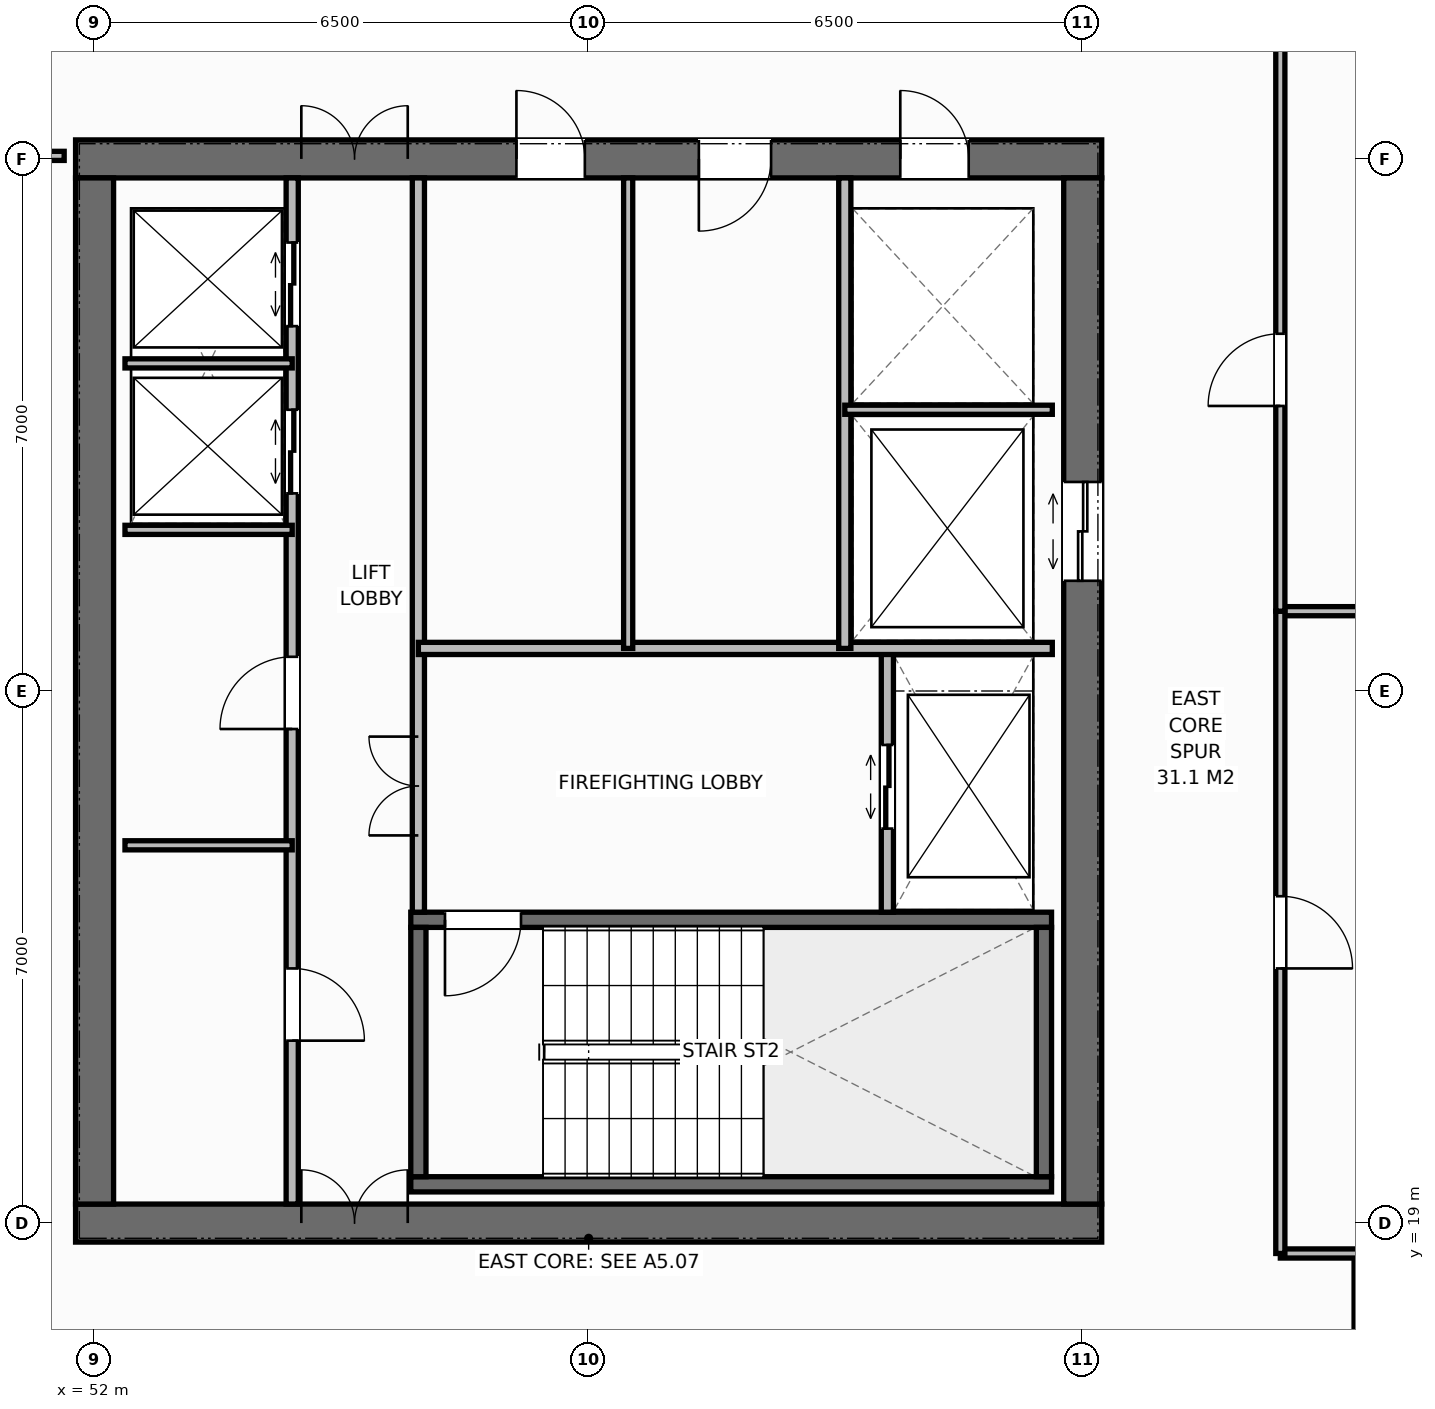
"""IFC4 building model, lengths in metres.
Left out: names, types, materials, properties, quantities, classifications, styles, units other than length and angle.
Written with IfcOpenShell. Run it as: python <this file> out.ifc"""

import sys

from ifc_helpers import new_model, si_unit, direction, frame, frame_2d, origin, place, context, subcontext, project, spatial, rectangle, extrude, element, fill, save


model = new_model("IFC4")
c1 = context("Model", 3, precision=1e-05, world=origin(), true_north=direction((0.0, 1.0)))
c2 = subcontext(c1, "Body", "Model", "MODEL_VIEW")
j1 = project(units=[si_unit("LENGTHUNIT", "METRE"), si_unit("PLANEANGLEUNIT", "RADIAN")], contexts=[c1])
p1 = place(None, origin())
s1 = spatial("IfcSite", under=j1, at=p1, CompositionType="ELEMENT")
p2 = place(p1, origin())
s2 = spatial("IfcBuilding", under=s1, at=p2, CompositionType="ELEMENT")
p3 = place(p2, frame((0.0, 0.0, 244.2)))
s3 = spatial("IfcBuildingStorey", under=s2, at=p3, CompositionType="ELEMENT", Elevation=244.2)
p4 = place(p3, frame((51.75, 19.0, 0.0), z_axis=(0.0, 0.0, 1.0), x_axis=(1.0, 0.0, 0.0)))
e1 = element("IfcWall", 1, at=p4, inside=s3, PredefinedType="SHEAR", context=c2, shape_type="SweptSolid", body=[
    extrude(rectangle(XDim=13.5, YDim=0.5, at=frame_2d((6.75, 0.0))), origin(), (0.0, 0.0, 1.0), 3.8),
])
p5 = place(p4, frame((2.97, 0.0, 0.0)))
e2 = element("IfcOpeningElement", 2, at=p5, cuts=e1, PredefinedType="OPENING", context=c2, shape_type="SweptSolid", body=[
    extrude(rectangle(XDim=1.4, YDim=2.2, at=frame_2d((0.7, 1.1))), frame((0.0, 0.26, 0.0), z_axis=(0.0, -1.0, 0.0), x_axis=(1.0, 0.0, 0.0)), (0.0, 0.0, 1.0), 0.52),
])
p6 = place(p3, frame((51.75, 33.0, 0.0), z_axis=(0.0, 0.0, 1.0), x_axis=(1.0, 0.0, 0.0)))
e3 = element("IfcWall", 3, at=p6, inside=s3, PredefinedType="SHEAR", context=c2, shape_type="SweptSolid", body=[
    extrude(rectangle(XDim=13.5, YDim=0.5, at=frame_2d((6.75, 0.0))), origin(), (0.0, 0.0, 1.0), 3.8),
])
p7 = place(p6, frame((2.97, 0.0, 0.0)))
e4 = element("IfcOpeningElement", 4, at=p7, cuts=e3, PredefinedType="OPENING", context=c2, shape_type="SweptSolid", body=[
    extrude(rectangle(XDim=1.4, YDim=2.2, at=frame_2d((0.7, 1.1))), frame((0.0, 0.26, 0.0), z_axis=(0.0, -1.0, 0.0), x_axis=(1.0, 0.0, 0.0)), (0.0, 0.0, 1.0), 0.52),
])
p8 = place(p6, frame((10.85, 0.0, 0.0)))
e5 = element("IfcOpeningElement", 5, at=p8, cuts=e3, PredefinedType="OPENING", context=c2, shape_type="SweptSolid", body=[
    extrude(rectangle(XDim=0.9, YDim=2.15, at=frame_2d((0.45, 1.075))), frame((0.0, 0.26, 0.0), z_axis=(0.0, -1.0, 0.0), x_axis=(1.0, 0.0, 0.0)), (0.0, 0.0, 1.0), 0.52),
])
p9 = place(p6, frame((5.8, 0.0, 0.0)))
e6 = element("IfcOpeningElement", 6, at=p9, cuts=e3, PredefinedType="OPENING", context=c2, shape_type="SweptSolid", body=[
    extrude(rectangle(XDim=0.9, YDim=2.15, at=frame_2d((0.45, 1.075))), frame((0.0, 0.26, 0.0), z_axis=(0.0, -1.0, 0.0), x_axis=(1.0, 0.0, 0.0)), (0.0, 0.0, 1.0), 0.52),
])
p10 = place(p6, frame((8.2, 0.0, 0.0)))
e7 = element("IfcOpeningElement", 7, at=p10, cuts=e3, PredefinedType="OPENING", context=c2, shape_type="SweptSolid", body=[
    extrude(rectangle(XDim=0.95, YDim=2.15, at=frame_2d((0.475, 1.075))), frame((0.0, 0.26, 0.0), z_axis=(0.0, -1.0, 0.0), x_axis=(1.0, 0.0, 0.0)), (0.0, 0.0, 1.0), 0.52),
])
p11 = place(p3, frame((52.0, 19.25, 0.0), z_axis=(0.0, 0.0, 1.0), x_axis=(0.0, 1.0, 0.0)))
e8 = element("IfcWall", 8, at=p11, inside=s3, PredefinedType="SHEAR", context=c2, shape_type="SweptSolid", body=[
    extrude(rectangle(XDim=13.5, YDim=0.5, at=frame_2d((6.75, 0.0))), origin(), (0.0, 0.0, 1.0), 3.8),
])
p12 = place(p3, frame((65.0, 19.25, 0.0), z_axis=(0.0, 0.0, 1.0), x_axis=(0.0, 1.0, 0.0)))
e9 = element("IfcWall", 9, at=p12, inside=s3, PredefinedType="SHEAR", context=c2, shape_type="SweptSolid", body=[
    extrude(rectangle(XDim=13.5, YDim=0.5, at=frame_2d((6.75, 0.0))), origin(), (0.0, 0.0, 1.0), 3.8),
])
p13 = place(p12, frame((8.2, 0.0, 0.0)))
e10 = element("IfcOpeningElement", 10, at=p13, cuts=e9, PredefinedType="OPENING", context=c2, shape_type="SweptSolid", body=[
    extrude(rectangle(XDim=1.3, YDim=2.2, at=frame_2d((0.65, 1.1))), frame((0.0, 0.26, 0.0), z_axis=(0.0, -1.0, 0.0), x_axis=(1.0, 0.0, 0.0)), (0.0, 0.0, 1.0), 0.52),
])
p14 = place(p3, frame((56.16, 19.51, 0.0), z_axis=(0.0, 0.0, 1.0), x_axis=(1.0, 0.0, 0.0)))
e11 = element("IfcWall", 11, at=p14, inside=s3, PredefinedType="SHEAR", context=c2, shape_type="SweptSolid", body=[
    extrude(rectangle(XDim=8.43, YDim=0.2, at=frame_2d((4.215, 0.0))), origin(), (0.0, 0.0, 1.0), 3.8),
])
p15 = place(p3, frame((56.16, 22.99, 0.0), z_axis=(0.0, 0.0, 1.0), x_axis=(1.0, 0.0, 0.0)))
e12 = element("IfcWall", 12, at=p15, inside=s3, PredefinedType="SHEAR", context=c2, shape_type="SweptSolid", body=[
    extrude(rectangle(XDim=8.43, YDim=0.2, at=frame_2d((4.215, 0.0))), origin(), (0.0, 0.0, 1.0), 3.8),
])
p16 = place(p15, frame((0.45, 0.0, 0.0)))
e13 = element("IfcOpeningElement", 13, at=p16, cuts=e12, PredefinedType="OPENING", context=c2, shape_type="SweptSolid", body=[
    extrude(rectangle(XDim=1.0, YDim=2.15, at=frame_2d((0.5, 1.075))), frame((0.0, 0.11, 0.0), z_axis=(0.0, -1.0, 0.0), x_axis=(1.0, 0.0, 0.0)), (0.0, 0.0, 1.0), 0.22),
])
for number, where, z_axis, x_axis in (
    (14, (56.26, 19.61, 0.0), (0.0, 0.0, 1.0), (0.0, 1.0, 0.0)),
    (15, (64.49, 19.61, 0.0), (0.0, 0.0, 1.0), (0.0, 1.0, 0.0)),
):
    element("IfcWall", number, at=place(p3, frame(where, z_axis=z_axis, x_axis=x_axis)), inside=s3, PredefinedType="SHEAR", context=c2, shape_type="SweptSolid", body=[
        extrude(rectangle(XDim=3.28, YDim=0.2, at=frame_2d((1.64, 0.0))), origin(), (0.0, 0.0, 1.0), 3.8),
    ])
p17 = place(p3, frame((54.6, 19.25, 0.0), z_axis=(0.0, 0.0, 1.0), x_axis=(0.0, 1.0, 0.0)))
e16 = element("IfcWall", 16, at=p17, inside=s3, PredefinedType="STANDARD", context=c2, shape_type="SweptSolid", body=[
    extrude(rectangle(XDim=13.5, YDim=0.16, at=frame_2d((6.75, 0.0))), origin(), (0.0, 0.0, 1.0), 3.58),
])
p18 = place(p17, frame((2.15, 0.0, 0.0)))
e17 = element("IfcOpeningElement", 17, at=p18, cuts=e16, PredefinedType="OPENING", context=c2, shape_type="SweptSolid", body=[
    extrude(rectangle(XDim=0.95, YDim=2.15, at=frame_2d((0.475, 1.075))), frame((0.0, 0.09, 0.0), z_axis=(0.0, -1.0, 0.0), x_axis=(1.0, 0.0, 0.0)), (0.0, 0.0, 1.0), 0.18),
])
p19 = place(p17, frame((6.25, 0.0, 0.0)))
e18 = element("IfcOpeningElement", 18, at=p19, cuts=e16, PredefinedType="OPENING", context=c2, shape_type="SweptSolid", body=[
    extrude(rectangle(XDim=0.95, YDim=2.15, at=frame_2d((0.475, 1.075))), frame((0.0, 0.09, 0.0), z_axis=(0.0, -1.0, 0.0), x_axis=(1.0, 0.0, 0.0)), (0.0, 0.0, 1.0), 0.18),
])
p20 = place(p17, frame((9.35, 0.0, 0.0)))
e19 = element("IfcOpeningElement", 19, at=p20, cuts=e16, PredefinedType="OPENING", context=c2, shape_type="SweptSolid", body=[
    extrude(rectangle(XDim=1.1, YDim=2.2, at=frame_2d((0.55, 1.1))), frame((0.0, 0.09, 0.0), z_axis=(0.0, -1.0, 0.0), x_axis=(1.0, 0.0, 0.0)), (0.0, 0.0, 1.0), 0.18),
])
p21 = place(p17, frame((11.55, 0.0, 0.0)))
e20 = element("IfcOpeningElement", 20, at=p21, cuts=e16, PredefinedType="OPENING", context=c2, shape_type="SweptSolid", body=[
    extrude(rectangle(XDim=1.1, YDim=2.2, at=frame_2d((0.55, 1.1))), frame((0.0, 0.09, 0.0), z_axis=(0.0, -1.0, 0.0), x_axis=(1.0, 0.0, 0.0)), (0.0, 0.0, 1.0), 0.18),
])
p22 = place(p3, frame((56.26, 23.09, 0.0), z_axis=(0.0, 0.0, 1.0), x_axis=(0.0, 1.0, 0.0)))
e21 = element("IfcWall", 21, at=p22, inside=s3, PredefinedType="STANDARD", context=c2, shape_type="SweptSolid", body=[
    extrude(rectangle(XDim=9.66, YDim=0.16, at=frame_2d((4.83, 0.0))), origin(), (0.0, 0.0, 1.0), 3.58),
])
p23 = place(p22, frame((1.01, 0.0, 0.0)))
e22 = element("IfcOpeningElement", 22, at=p23, cuts=e21, PredefinedType="OPENING", context=c2, shape_type="SweptSolid", body=[
    extrude(rectangle(XDim=1.3, YDim=2.2, at=frame_2d((0.65, 1.1))), frame((0.0, 0.09, 0.0), z_axis=(0.0, -1.0, 0.0), x_axis=(1.0, 0.0, 0.0)), (0.0, 0.0, 1.0), 0.18),
])
for number, where, z_axis, x_axis in (
    (23, (52.4, 23.97, 0.0), (0.0, 0.0, 1.0), (1.0, 0.0, 0.0)),
    (24, (52.4, 28.12, 0.0), (0.0, 0.0, 1.0), (1.0, 0.0, 0.0)),
    (25, (52.4, 30.31, 0.0), (0.0, 0.0, 1.0), (1.0, 0.0, 0.0)),
):
    element("IfcWall", number, at=place(p3, frame(where, z_axis=z_axis, x_axis=x_axis)), inside=s3, PredefinedType="PARTITIONING", context=c2, shape_type="SweptSolid", body=[
        extrude(rectangle(XDim=2.2, YDim=0.12, at=frame_2d((1.1, 0.0))), origin(), (0.0, 0.0, 1.0), 3.58),
    ])
p24 = place(p3, frame((62.43, 23.09, 0.0), z_axis=(0.0, 0.0, 1.0), x_axis=(0.0, 1.0, 0.0)))
e26 = element("IfcWall", 26, at=p24, inside=s3, PredefinedType="STANDARD", context=c2, shape_type="SweptSolid", body=[
    extrude(rectangle(XDim=3.47, YDim=0.16, at=frame_2d((1.735, 0.0))), origin(), (0.0, 0.0, 1.0), 3.58),
])
p25 = place(p24, frame((1.1, 0.0, 0.0)))
e27 = element("IfcOpeningElement", 27, at=p25, cuts=e26, PredefinedType="OPENING", context=c2, shape_type="SweptSolid", body=[
    extrude(rectangle(XDim=1.1, YDim=2.2, at=frame_2d((0.55, 1.1))), frame((0.0, 0.09, 0.0), z_axis=(0.0, -1.0, 0.0), x_axis=(1.0, 0.0, 0.0)), (0.0, 0.0, 1.0), 0.18),
])
p26 = place(p3, frame((56.26, 26.56, 0.0), z_axis=(0.0, 0.0, 1.0), x_axis=(1.0, 0.0, 0.0)))
e28 = element("IfcWall", 28, at=p26, inside=s3, PredefinedType="STANDARD", context=c2, shape_type="SweptSolid", body=[
    extrude(rectangle(XDim=8.34, YDim=0.16, at=frame_2d((4.17, 0.0))), origin(), (0.0, 0.0, 1.0), 3.58),
])
p27 = place(p3, frame((61.87, 26.56, 0.0), z_axis=(0.0, 0.0, 1.0), x_axis=(0.0, 1.0, 0.0)))
e29 = element("IfcWall", 29, at=p27, inside=s3, PredefinedType="STANDARD", context=c2, shape_type="SweptSolid", body=[
    extrude(rectangle(XDim=6.19, YDim=0.16, at=frame_2d((3.095, 0.0))), origin(), (0.0, 0.0, 1.0), 3.58),
])
p28 = place(p3, frame((61.87, 29.7, 0.0), z_axis=(0.0, 0.0, 1.0), x_axis=(1.0, 0.0, 0.0)))
e30 = element("IfcWall", 30, at=p28, inside=s3, PredefinedType="PARTITIONING", context=c2, shape_type="SweptSolid", body=[
    extrude(rectangle(XDim=2.73, YDim=0.12, at=frame_2d((1.365, 0.0))), origin(), (0.0, 0.0, 1.0), 3.58),
])
p29 = place(p3, frame((59.02, 26.56, 0.0), z_axis=(0.0, 0.0, 1.0), x_axis=(0.0, 1.0, 0.0)))
e31 = element("IfcWall", 31, at=p29, inside=s3, PredefinedType="PARTITIONING", context=c2, shape_type="SweptSolid", body=[
    extrude(rectangle(XDim=6.19, YDim=0.12, at=frame_2d((3.095, 0.0))), origin(), (0.0, 0.0, 1.0), 3.58),
])
p30 = place(p3, frame((48.0, 33.04, 0.0), z_axis=(0.0, 0.0, 1.0), x_axis=(1.0, 0.0, 0.0)))
e32 = element("IfcWall", 32, at=p30, inside=s3, PredefinedType="PARTITIONING", context=c2, shape_type="SweptSolid", body=[
    extrude(rectangle(XDim=3.6, YDim=0.12, at=frame_2d((1.8, 0.0))), origin(), (0.0, 0.0, 1.0), 3.32),
])
p31 = place(p30, frame((1.1, 0.0, 0.0)))
e33 = element("IfcOpeningElement", 33, at=p31, cuts=e32, PredefinedType="OPENING", context=c2, shape_type="SweptSolid", body=[
    extrude(rectangle(XDim=0.95, YDim=2.15, at=frame_2d((0.475, 1.075))), frame((0.0, 0.07, 0.0), z_axis=(0.0, -1.0, 0.0), x_axis=(1.0, 0.0, 0.0)), (0.0, 0.0, 1.0), 0.14),
])
p32 = place(p3, frame((68.63, 16.5, 0.0), z_axis=(0.0, 0.0, 1.0), x_axis=(0.0, 1.0, 0.0)))
e34 = element("IfcWall", 34, at=p32, inside=s3, PredefinedType="PARTITIONING", context=c2, shape_type="SweptSolid", body=[
    extrude(rectangle(XDim=2.1, YDim=0.12, at=frame_2d((1.05, 0.0))), origin(), (0.0, 0.0, 1.0), 3.58),
])
for number, where, z_axis, x_axis in (
    (35, (67.6, 18.6, 0.0), (0.0, 0.0, 1.0), (1.0, 0.0, 0.0)),
    (36, (67.6, 27.05, 0.0), (0.0, 0.0, 1.0), (1.0, 0.0, 0.0)),
):
    element("IfcWall", number, at=place(p3, frame(where, z_axis=z_axis, x_axis=x_axis)), inside=s3, PredefinedType="PARTITIONING", context=c2, shape_type="SweptSolid", body=[
        extrude(rectangle(XDim=4.58, YDim=0.12, at=frame_2d((2.29, 0.0))), origin(), (0.0, 0.0, 1.0), 3.58),
    ])
p33 = place(p3, frame((67.6, 18.6, 0.0), z_axis=(0.0, 0.0, 1.0), x_axis=(0.0, 1.0, 0.0)))
e37 = element("IfcWall", 37, at=p33, inside=s3, PredefinedType="PARTITIONING", context=c2, shape_type="SweptSolid", body=[
    extrude(rectangle(XDim=8.45, YDim=0.12, at=frame_2d((4.225, 0.0))), origin(), (0.0, 0.0, 1.0), 3.58),
])
p34 = place(p33, frame((3.75, 0.0, 0.0)))
e38 = element("IfcOpeningElement", 38, at=p34, cuts=e37, PredefinedType="OPENING", context=c2, shape_type="SweptSolid", body=[
    extrude(rectangle(XDim=0.95, YDim=2.15, at=frame_2d((0.475, 1.075))), frame((0.0, 0.07, 0.0), z_axis=(0.0, -1.0, 0.0), x_axis=(1.0, 0.0, 0.0)), (0.0, 0.0, 1.0), 0.14),
])
p35 = place(p3, frame((67.6, 27.05, 0.0), z_axis=(0.0, 0.0, 1.0), x_axis=(0.0, 1.0, 0.0)))
e39 = element("IfcWall", 39, at=p35, inside=s3, PredefinedType="PARTITIONING", context=c2, shape_type="SweptSolid", body=[
    extrude(rectangle(XDim=8.45, YDim=0.12, at=frame_2d((4.225, 0.0))), origin(), (0.0, 0.0, 1.0), 3.58),
])
p36 = place(p35, frame((2.7, 0.0, 0.0)))
e40 = element("IfcOpeningElement", 40, at=p36, cuts=e39, PredefinedType="OPENING", context=c2, shape_type="SweptSolid", body=[
    extrude(rectangle(XDim=0.95, YDim=2.15, at=frame_2d((0.475, 1.075))), frame((0.0, 0.07, 0.0), z_axis=(0.0, -1.0, 0.0), x_axis=(1.0, 0.0, 0.0)), (0.0, 0.0, 1.0), 0.14),
])
p37 = place(p5, origin())
e41 = element("IfcDoor", 41, at=p37, inside=s3, OperationType="DOUBLE_DOOR_SINGLE_SWING", PredefinedType="DOOR", context=c2, shape_type="SweptSolid", body=[
    extrude(rectangle(XDim=1.4, YDim=2.2, at=frame_2d((0.7, 1.1))), frame((0.0, 0.075, 0.0), z_axis=(0.0, -1.0, 0.0), x_axis=(1.0, 0.0, 0.0)), (0.0, 0.0, 1.0), 0.05),
])
fill(e2, e41)
p38 = place(p7, origin())
e42 = element("IfcDoor", 42, at=p38, inside=s3, OperationType="DOUBLE_DOOR_SINGLE_SWING", PredefinedType="DOOR", context=c2, shape_type="SweptSolid", body=[
    extrude(rectangle(XDim=1.4, YDim=2.2, at=frame_2d((0.7, 1.1))), frame((0.0, -0.025, 0.0), z_axis=(0.0, -1.0, 0.0), x_axis=(1.0, 0.0, 0.0)), (0.0, 0.0, 1.0), 0.05),
])
fill(e4, e42)
p39 = place(p18, origin())
e43 = element("IfcDoor", 43, at=p39, inside=s3, OperationType="SINGLE_SWING_RIGHT", PredefinedType="DOOR", context=c2, shape_type="SweptSolid", body=[
    extrude(rectangle(XDim=0.95, YDim=2.15, at=frame_2d((0.475, 1.075))), frame((0.0, 0.025, 0.0), z_axis=(0.0, -1.0, 0.0), x_axis=(1.0, 0.0, 0.0)), (0.0, 0.0, 1.0), 0.05),
])
fill(e17, e43)
p40 = place(p19, origin())
e44 = element("IfcDoor", 44, at=p40, inside=s3, OperationType="SINGLE_SWING_LEFT", PredefinedType="DOOR", context=c2, shape_type="SweptSolid", body=[
    extrude(rectangle(XDim=0.95, YDim=2.15, at=frame_2d((0.475, 1.075))), frame((0.0, 0.025, 0.0), z_axis=(0.0, -1.0, 0.0), x_axis=(1.0, 0.0, 0.0)), (0.0, 0.0, 1.0), 0.05),
])
fill(e18, e44)
p41 = place(p20, origin())
e45 = element("IfcDoor", 45, at=p41, inside=s3, OperationType="DOUBLE_DOOR_SLIDING", PredefinedType="DOOR", context=c2, shape_type="SweptSolid", body=[
    extrude(rectangle(XDim=1.1, YDim=2.2, at=frame_2d((0.55, 1.1))), frame((0.0, 0.025, 0.0), z_axis=(0.0, -1.0, 0.0), x_axis=(1.0, 0.0, 0.0)), (0.0, 0.0, 1.0), 0.05),
])
fill(e19, e45)
p42 = place(p21, origin())
e46 = element("IfcDoor", 46, at=p42, inside=s3, OperationType="DOUBLE_DOOR_SLIDING", PredefinedType="DOOR", context=c2, shape_type="SweptSolid", body=[
    extrude(rectangle(XDim=1.1, YDim=2.2, at=frame_2d((0.55, 1.1))), frame((0.0, 0.025, 0.0), z_axis=(0.0, -1.0, 0.0), x_axis=(1.0, 0.0, 0.0)), (0.0, 0.0, 1.0), 0.05),
])
fill(e20, e46)
p43 = place(p16, origin())
e47 = element("IfcDoor", 47, at=p43, inside=s3, OperationType="SINGLE_SWING_RIGHT", PredefinedType="DOOR", context=c2, shape_type="SweptSolid", body=[
    extrude(rectangle(XDim=1.0, YDim=2.15, at=frame_2d((0.5, 1.075))), frame((0.0, 0.025, 0.0), z_axis=(0.0, -1.0, 0.0), x_axis=(1.0, 0.0, 0.0)), (0.0, 0.0, 1.0), 0.05),
])
fill(e13, e47)
p44 = place(p25, origin())
e48 = element("IfcDoor", 48, at=p44, inside=s3, OperationType="DOUBLE_DOOR_SLIDING", PredefinedType="DOOR", context=c2, shape_type="SweptSolid", body=[
    extrude(rectangle(XDim=1.1, YDim=2.2, at=frame_2d((0.55, 1.1))), frame((0.0, 0.025, 0.0), z_axis=(0.0, -1.0, 0.0), x_axis=(1.0, 0.0, 0.0)), (0.0, 0.0, 1.0), 0.05),
])
fill(e27, e48)
p45 = place(p23, origin())
e49 = element("IfcDoor", 49, at=p45, inside=s3, OperationType="DOUBLE_DOOR_SINGLE_SWING", PredefinedType="DOOR", context=c2, shape_type="SweptSolid", body=[
    extrude(rectangle(XDim=1.3, YDim=2.2, at=frame_2d((0.65, 1.1))), frame((0.0, 0.025, 0.0), z_axis=(0.0, -1.0, 0.0), x_axis=(1.0, 0.0, 0.0)), (0.0, 0.0, 1.0), 0.05),
])
fill(e22, e49)
p46 = place(p13, origin())
e50 = element("IfcDoor", 50, at=p46, inside=s3, OperationType="DOUBLE_DOOR_SLIDING", PredefinedType="DOOR", context=c2, shape_type="SweptSolid", body=[
    extrude(rectangle(XDim=1.3, YDim=2.2, at=frame_2d((0.65, 1.1))), frame((0.0, 0.025, 0.0), z_axis=(0.0, -1.0, 0.0), x_axis=(1.0, 0.0, 0.0)), (0.0, 0.0, 1.0), 0.05),
])
fill(e10, e50)
p47 = place(p8, origin())
e51 = element("IfcDoor", 51, at=p47, inside=s3, OperationType="SINGLE_SWING_LEFT", PredefinedType="DOOR", context=c2, shape_type="SweptSolid", body=[
    extrude(rectangle(XDim=0.9, YDim=2.15, at=frame_2d((0.45, 1.075))), frame((0.0, -0.025, 0.0), z_axis=(0.0, -1.0, 0.0), x_axis=(1.0, 0.0, 0.0)), (0.0, 0.0, 1.0), 0.05),
])
fill(e5, e51)
p48 = place(p9, origin())
e52 = element("IfcDoor", 52, at=p48, inside=s3, OperationType="SINGLE_SWING_LEFT", PredefinedType="DOOR", context=c2, shape_type="SweptSolid", body=[
    extrude(rectangle(XDim=0.9, YDim=2.15, at=frame_2d((0.45, 1.075))), frame((0.0, -0.025, 0.0), z_axis=(0.0, -1.0, 0.0), x_axis=(1.0, 0.0, 0.0)), (0.0, 0.0, 1.0), 0.05),
])
fill(e6, e52)
p49 = place(p10, origin())
e53 = element("IfcDoor", 53, at=p49, inside=s3, OperationType="SINGLE_SWING_RIGHT", PredefinedType="DOOR", context=c2, shape_type="SweptSolid", body=[
    extrude(rectangle(XDim=0.95, YDim=2.15, at=frame_2d((0.475, 1.075))), frame((0.0, -0.025, 0.0), z_axis=(0.0, -1.0, 0.0), x_axis=(1.0, 0.0, 0.0)), (0.0, 0.0, 1.0), 0.05),
])
fill(e7, e53)
p50 = place(p34, origin())
e54 = element("IfcDoor", 54, at=p50, inside=s3, OperationType="SINGLE_SWING_RIGHT", PredefinedType="DOOR", context=c2, shape_type="SweptSolid", body=[
    extrude(rectangle(XDim=0.95, YDim=2.15, at=frame_2d((0.475, 1.075))), frame((0.0, 0.025, 0.0), z_axis=(0.0, -1.0, 0.0), x_axis=(1.0, 0.0, 0.0)), (0.0, 0.0, 1.0), 0.05),
])
fill(e38, e54)
p51 = place(p36, origin())
e55 = element("IfcDoor", 55, at=p51, inside=s3, OperationType="SINGLE_SWING_LEFT", PredefinedType="DOOR", context=c2, shape_type="SweptSolid", body=[
    extrude(rectangle(XDim=0.95, YDim=2.15, at=frame_2d((0.475, 1.075))), frame((0.0, 0.025, 0.0), z_axis=(0.0, -1.0, 0.0), x_axis=(1.0, 0.0, 0.0)), (0.0, 0.0, 1.0), 0.05),
])
fill(e40, e55)
save(model, sys.argv[1])
